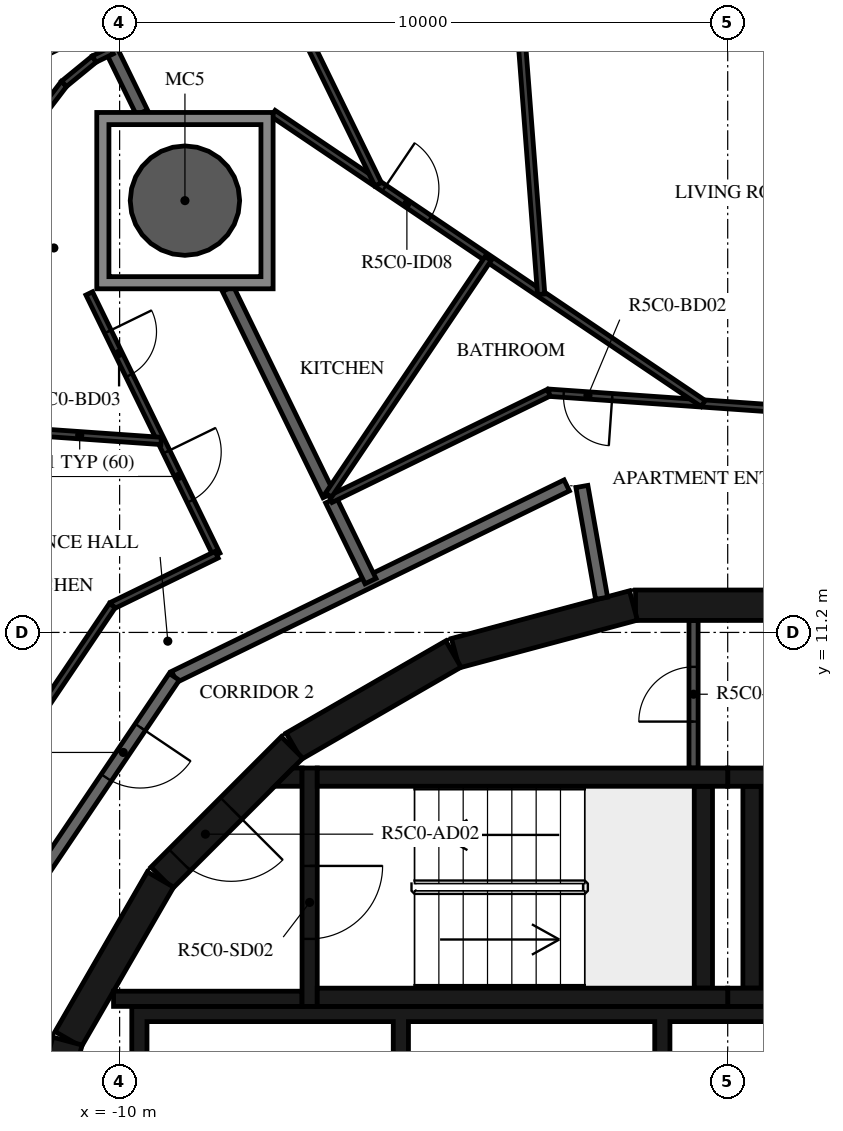
"""IFC4 building model, lengths in metres.
Left out: names, types, materials, properties, quantities, classifications, styles, units other than length and angle.
Written with IfcOpenShell. Run it as: python <this file> out.ifc"""

import sys

from ifc_helpers import new_model, si_unit, direction, frame, frame_2d, origin, origin_2d, place, context, subcontext, project, spatial, polyline, rectangle, hollow_circle, outline, extrude, element, fill, save


model = new_model("IFC4")
c1 = context("Model", 3, precision=1e-05, world=origin(), true_north=direction((0.0, 1.0)))
c2 = subcontext(c1, "Body", "Model", "MODEL_VIEW")
j1 = project(units=[si_unit("LENGTHUNIT", "METRE"), si_unit("PLANEANGLEUNIT", "RADIAN")], contexts=[c1])
p1 = place(None, origin())
s1 = spatial("IfcSite", under=j1, at=p1, CompositionType="ELEMENT")
p2 = place(p1, origin())
s2 = spatial("IfcBuilding", under=s1, at=p2, CompositionType="ELEMENT")
p3 = place(p2, frame((0.0, 0.0, 209.4)))
s3 = spatial("IfcBuildingStorey", under=s2, at=p3, CompositionType="ELEMENT", Elevation=209.4)
p4 = place(p3, frame((-8.926, 18.301, -0.38), z_axis=(0.0, 0.0, 1.0), x_axis=(1.0, 0.0, 0.0)))
e1 = element("IfcColumn", 1, at=p4, inside=s3, PredefinedType="COLUMN", context=c2, shape_type="SweptSolid", body=[
    extrude(hollow_circle(Radius=0.9, WallThickness=0.04, at=origin_2d()), origin(), (0.0, 0.0, 1.0), 3.5),
])
for number, where, z_axis, x_axis in (
    (2, (1.516, 11.647, 0.0), (0.0, 0.0, 1.0), (-1.0, 0.0, 0.0)),
    (3, (-1.55, 11.643, 0.0), (0.0, 0.0, 1.0), (-0.966, -0.259, 0.0)),
    (4, (-4.51, 10.845, 0.0), (0.0, 0.0, 1.0), (-0.866, -0.5, 0.0)),
):
    element("IfcWall", number, at=place(p3, frame(where, z_axis=z_axis, x_axis=x_axis)), inside=s3, PredefinedType="SHEAR", context=c2, shape_type="SweptSolid", body=[
        extrude(rectangle(XDim=3.033, YDim=0.5, at=frame_2d((1.516, 0.0))), origin(), (0.0, 0.0, 1.0), 3.12),
    ])
p5 = place(p3, frame((-7.164, 9.308, 0.0), z_axis=(0.0, 0.0, 1.0), x_axis=(-0.707106781187, -0.707106781187, 0.0)))
e5 = element("IfcWall", 5, at=p5, inside=s3, PredefinedType="SHEAR", context=c2, shape_type="SweptSolid", body=[
    extrude(rectangle(XDim=3.032, YDim=0.5, at=frame_2d((1.516, 0.0))), origin(), (0.0, 0.0, 1.0), 3.12),
])
p6 = place(p5, frame((1.416, 0.0, 0.0)))
e6 = element("IfcOpeningElement", 6, at=p6, cuts=e5, PredefinedType="OPENING", context=c2, shape_type="SweptSolid", body=[
    extrude(rectangle(XDim=1.2, YDim=2.1, at=frame_2d((0.6, 1.05))), frame((0.0, 0.26, 0.0), z_axis=(0.0, -1.0, 0.0), x_axis=(1.0, 0.0, 0.0)), (0.0, 0.0, 1.0), 0.52),
])
for number, where, z_axis, x_axis in (
    (7, (-9.329, 7.137, 0.0), (0.0, 0.0, 1.0), (-0.5, -0.866, 0.0)),
    (8, (-10.858, 4.479, 0.0), (0.0, 0.0, 1.0), (-0.259, -0.966, 0.0)),
):
    element("IfcWall", number, at=place(p3, frame(where, z_axis=z_axis, x_axis=x_axis)), inside=s3, PredefinedType="SHEAR", context=c2, shape_type="SweptSolid", body=[
        extrude(rectangle(XDim=3.033, YDim=0.5, at=frame_2d((1.516, 0.0))), origin(), (0.0, 0.0, 1.0), 3.12),
    ])
for number, where, z_axis, x_axis in (
    (9, (0.0, 5.2, 0.0), (0.0, 0.0, 1.0), (1.0, 0.0, 0.0)),
    (10, (0.0, 8.82, 0.0), (0.0, 0.0, 1.0), (1.0, 0.0, 0.0)),
):
    element("IfcWall", number, at=place(p3, frame(where, z_axis=z_axis, x_axis=x_axis)), inside=s3, PredefinedType="SHEAR", context=c2, shape_type="SweptSolid", body=[
        extrude(rectangle(XDim=6.75, YDim=0.3, at=frame_2d((3.375, 0.0))), origin(), (0.0, 0.0, 1.0), 3.12),
    ])
p7 = place(p3, frame((0.4, 5.35, 0.0), z_axis=(0.0, 0.0, 1.0), x_axis=(0.0, 1.0, 0.0)))
e11 = element("IfcWall", 11, at=p7, inside=s3, PredefinedType="SHEAR", context=c2, shape_type="SweptSolid", body=[
    extrude(rectangle(XDim=3.32, YDim=0.3, at=frame_2d((1.66, 0.0))), origin(), (0.0, 0.0, 1.0), 3.12),
])
for number, where, z_axis, x_axis in (
    (12, (-6.75, 5.2, 0.0), (0.0, 0.0, 1.0), (1.0, 0.0, 0.0)),
    (13, (-6.75, 8.82, 0.0), (0.0, 0.0, 1.0), (1.0, 0.0, 0.0)),
):
    element("IfcWall", number, at=place(p3, frame(where, z_axis=z_axis, x_axis=x_axis)), inside=s3, PredefinedType="SHEAR", context=c2, shape_type="SweptSolid", body=[
        extrude(rectangle(XDim=6.75, YDim=0.3, at=frame_2d((3.375, 0.0))), origin(), (0.0, 0.0, 1.0), 3.12),
    ])
p8 = place(p3, frame((-0.4, 5.35, 0.0), z_axis=(0.0, 0.0, 1.0), x_axis=(0.0, 1.0, 0.0)))
e14 = element("IfcWall", 14, at=p8, inside=s3, PredefinedType="SHEAR", context=c2, shape_type="SweptSolid", body=[
    extrude(rectangle(XDim=3.32, YDim=0.3, at=frame_2d((1.66, 0.0))), origin(), (0.0, 0.0, 1.0), 3.12),
])
p9 = place(p3, frame((-6.875, 8.97, 0.0), z_axis=(0.0, 0.0, 1.0), x_axis=(0.0, -1.0, 0.0)))
e15 = element("IfcWall", 15, at=p9, inside=s3, PredefinedType="SHEAR", context=c2, shape_type="SweptSolid", body=[
    extrude(rectangle(XDim=3.92, YDim=0.25, at=frame_2d((1.96, 0.0))), origin(), (0.0, 0.0, 1.0), 3.12),
])
p10 = place(p9, frame((1.61, 0.0, 0.0)))
e16 = element("IfcOpeningElement", 16, at=p10, cuts=e15, PredefinedType="OPENING", context=c2, shape_type="SweptSolid", body=[
    extrude(rectangle(XDim=1.2, YDim=2.1, at=frame_2d((0.6, 1.05))), frame((0.0, 0.135, 0.0), z_axis=(0.0, -1.0, 0.0), x_axis=(1.0, 0.0, 0.0)), (0.0, 0.0, 1.0), 0.27),
])
p11 = place(p3, frame((-7.0, 5.175, 0.0), z_axis=(0.0, 0.0, 1.0), x_axis=(-1.0, 0.0, 0.0)))
e17 = element("IfcWall", 17, at=p11, inside=s3, PredefinedType="SHEAR", context=c2, shape_type="SweptSolid", body=[
    extrude(rectangle(XDim=3.1, YDim=0.25, at=frame_2d((1.55, 0.0))), origin(), (0.0, 0.0, 1.0), 3.12),
])
p12 = place(p3, origin())
e18 = element("IfcWall", 18, at=p12, inside=s3, PredefinedType="SHEAR", context=c2, shape_type="SweptSolid", body=[
    extrude(outline(polyline([(-7.148, 8.97), (-7.0, 8.97), (-7.0, 8.67), (-7.448, 8.67), (-7.148, 8.97)])), origin(), (0.0, 0.0, 1.0), 3.12),
])
p13 = place(p3, origin())
e19 = element("IfcWall", 19, at=p13, inside=s3, PredefinedType="SHEAR", context=c2, shape_type="SweptSolid", body=[
    extrude(outline(polyline([(-9.55, 4.8), (-5.5, 4.8), (-5.5, 1.9), (-5.25, 1.9), (-5.25, 4.8), (-1.2, 4.8), (-1.2, 1.9), (-0.95, 1.9), (-0.95, 4.8), (0.95, 4.8), (0.95, 1.9), (1.2, 1.9), (1.2, 4.8), (3.1, 4.8), (3.1, 1.9), (3.35, 1.9), (3.35, 4.8), (5.25, 4.8), (5.25, 1.9), (5.5, 1.9), (5.5, 4.8), (7.4, 4.8), (7.4, 1.9), (7.65, 1.9), (7.65, 4.8), (9.55, 4.8), (9.55, 1.9), (9.8, 1.9), (9.8, 4.8), (9.8, 5.05), (-9.8, 5.05), (-9.8, 4.8), (-9.8, 1.9), (-9.55, 1.9), (-9.55, 4.8)])), origin(), (0.0, 0.0, 1.0), 3.12),
])
p14 = place(p3, frame((-0.562, 8.97, 0.0), z_axis=(0.0, 0.0, 1.0), x_axis=(0.0, 1.0, 0.0)))
e20 = element("IfcWall", 20, at=p14, inside=s3, PredefinedType="PARTITIONING", context=c2, shape_type="SweptSolid", body=[
    extrude(rectangle(XDim=2.427, YDim=0.15, at=frame_2d((1.214, 0.0))), origin(), (0.0, 0.0, 1.0), 3.12),
])
p15 = place(p14, frame((0.764, 0.0, 0.0)))
e21 = element("IfcOpeningElement", 21, at=p15, cuts=e20, PredefinedType="OPENING", context=c2, shape_type="SweptSolid", body=[
    extrude(rectangle(XDim=0.9, YDim=2.1, at=frame_2d((0.45, 1.05))), frame((0.0, 0.085, 0.0), z_axis=(0.0, -1.0, 0.0), x_axis=(1.0, 0.0, 0.0)), (0.0, 0.0, 1.0), 0.17),
])
p16 = place(p3, frame((-2.074, 11.761, 0.0), z_axis=(0.0, 0.0, 1.0), x_axis=(-0.173740587112, 0.984791454263, 0.0)))
e22 = element("IfcWall", 22, at=p16, inside=s3, PredefinedType="STANDARD", context=c2, shape_type="SweptSolid", body=[
    extrude(rectangle(XDim=1.867, YDim=0.2, at=frame_2d((0.934, 0.0))), origin(), (0.0, 0.0, 1.0), 3.12),
])
p17 = place(p3, frame((-2.647, 13.618, 0.0), z_axis=(0.0, 0.0, 1.0), x_axis=(-0.898796543751, -0.438366026218, 0.0)))
e23 = element("IfcWall", 23, at=p17, inside=s3, PredefinedType="STANDARD", context=c2, shape_type="SweptSolid", body=[
    extrude(rectangle(XDim=7.181, YDim=0.2, at=frame_2d((3.591, 0.0))), origin(), (0.0, 0.0, 1.0), 3.12),
])
p18 = place(p3, frame((-9.101, 10.47, 0.0), z_axis=(0.0, 0.0, 1.0), x_axis=(-0.559195469534, -0.829035841718, 0.0)))
e24 = element("IfcWall", 24, at=p18, inside=s3, PredefinedType="STANDARD", context=c2, shape_type="SweptSolid", body=[
    extrude(rectangle(XDim=7.181, YDim=0.2, at=frame_2d((3.591, 0.0))), origin(), (0.0, 0.0, 1.0), 3.12),
])
p19 = place(p18, frame((1.0, 0.0, 0.0)))
e25 = element("IfcOpeningElement", 25, at=p19, cuts=e24, PredefinedType="OPENING", context=c2, shape_type="SweptSolid", body=[
    extrude(rectangle(XDim=1.0, YDim=2.1, at=frame_2d((0.5, 1.05))), frame((0.0, 0.11, 0.0), z_axis=(0.0, -1.0, 0.0), x_axis=(1.0, 0.0, 0.0)), (0.0, 0.0, 1.0), 0.22),
])
p20 = place(p3, frame((-6.522, 13.373, 0.0), z_axis=(0.0, 0.0, 1.0), x_axis=(0.438277270821, -0.8988398266, 0.0)))
e26 = element("IfcWall", 26, at=p20, inside=s3, PredefinedType="STANDARD", context=c2, shape_type="SweptSolid", body=[
    extrude(rectangle(XDim=1.479, YDim=0.2, at=frame_2d((0.74, 0.0))), origin(), (0.0, 0.0, 1.0), 3.12),
])
p21 = place(p3, frame((-8.219, 16.851, 0.0), z_axis=(0.0, 0.0, 1.0), x_axis=(0.438291091101, -0.898833087654, 0.0)))
e27 = element("IfcWall", 27, at=p21, inside=s3, PredefinedType="STANDARD", context=c2, shape_type="SweptSolid", body=[
    extrude(rectangle(XDim=3.774, YDim=0.2, at=frame_2d((1.887, 0.0))), origin(), (0.0, 0.0, 1.0), 3.12),
])
p22 = place(p3, frame((-12.409, 25.442, 0.0), z_axis=(0.0, 0.0, 1.0), x_axis=(0.43838641251, -0.898786600549, 0.0)))
e28 = element("IfcWall", 28, at=p22, inside=s3, PredefinedType="STANDARD", context=c2, shape_type="SweptSolid", body=[
    extrude(rectangle(XDim=6.333, YDim=0.2, at=frame_2d((3.166, 0.0))), origin(), (0.0, 0.0, 1.0), 3.12),
])
p23 = place(p3, frame((4.477, 14.623, 0.0), z_axis=(0.0, 0.0, 1.0), x_axis=(-0.997564862172, 0.069744861884, 0.0)))
e29 = element("IfcWall", 29, at=p23, inside=s3, PredefinedType="PARTITIONING", context=c2, shape_type="SweptSolid", body=[
    extrude(rectangle(XDim=7.438, YDim=0.12, at=frame_2d((3.719, 0.0))), origin(), (0.0, 0.0, 1.0), 3.12),
])
p24 = place(p23, frame((0.2, 0.0, 0.0)))
e30 = element("IfcOpeningElement", 30, at=p24, cuts=e29, PredefinedType="OPENING", context=c2, shape_type="SweptSolid", body=[
    extrude(rectangle(XDim=0.9, YDim=2.1, at=frame_2d((0.45, 1.05))), frame((0.0, 0.07, 0.0), z_axis=(0.0, -1.0, 0.0), x_axis=(1.0, 0.0, 0.0)), (0.0, 0.0, 1.0), 0.14),
])
p25 = place(p23, frame((6.392, 0.0, 0.0)))
e31 = element("IfcOpeningElement", 31, at=p25, cuts=e29, PredefinedType="OPENING", context=c2, shape_type="SweptSolid", body=[
    extrude(rectangle(XDim=0.8, YDim=2.1, at=frame_2d((0.4, 1.05))), frame((0.0, 0.07, 0.0), z_axis=(0.0, -1.0, 0.0), x_axis=(1.0, 0.0, 0.0)), (0.0, 0.0, 1.0), 0.14),
])
p26 = place(p3, frame((-2.943, 15.142, 0.0), z_axis=(0.0, 0.0, 1.0), x_axis=(-0.89881075705, -0.438336883014, 0.0)))
e32 = element("IfcWall", 32, at=p26, inside=s3, PredefinedType="PARTITIONING", context=c2, shape_type="SweptSolid", body=[
    extrude(rectangle(XDim=3.992, YDim=0.12, at=frame_2d((1.996, 0.0))), origin(), (0.0, 0.0, 1.0), 3.12),
])
p27 = place(p3, frame((-7.476, 19.735, 0.0), z_axis=(0.0, 0.0, 1.0), x_axis=(0.829035412992, -0.559196105142, 0.0)))
e33 = element("IfcWall", 33, at=p27, inside=s3, PredefinedType="PARTITIONING", context=c2, shape_type="SweptSolid", body=[
    extrude(rectangle(XDim=8.531, YDim=0.12, at=frame_2d((4.266, 0.0))), origin(), (0.0, 0.0, 1.0), 3.12),
])
p28 = place(p27, frame((2.204, 0.0, 0.0)))
e34 = element("IfcOpeningElement", 34, at=p28, cuts=e33, PredefinedType="OPENING", context=c2, shape_type="SweptSolid", body=[
    extrude(rectangle(XDim=0.9, YDim=2.1, at=frame_2d((0.45, 1.05))), frame((0.0, 0.07, 0.0), z_axis=(0.0, -1.0, 0.0), x_axis=(1.0, 0.0, 0.0)), (0.0, 0.0, 1.0), 0.14),
])
p29 = place(p3, frame((-3.653, 24.394, 0.0), z_axis=(0.0, 0.0, 1.0), x_axis=(0.076513576433, -0.997068539581, 0.0)))
e35 = element("IfcWall", 35, at=p29, inside=s3, PredefinedType="PARTITIONING", context=c2, shape_type="SweptSolid", body=[
    extrude(rectangle(XDim=7.655, YDim=0.12, at=frame_2d((3.827, 0.0))), origin(), (0.0, 0.0, 1.0), 3.12),
])
p30 = place(p29, frame((0.6, 0.0, 0.0)))
e36 = element("IfcOpeningElement", 36, at=p30, cuts=e35, PredefinedType="OPENING", context=c2, shape_type="SweptSolid", body=[
    extrude(rectangle(XDim=0.9, YDim=2.1, at=frame_2d((0.45, 1.05))), frame((0.0, 0.07, 0.0), z_axis=(0.0, -1.0, 0.0), x_axis=(1.0, 0.0, 0.0)), (0.0, 0.0, 1.0), 0.14),
])
p31 = place(p3, frame((-3.939, 17.35, 0.0), z_axis=(0.0, 0.0, 1.0), x_axis=(-0.559193216274, -0.829037361566, 0.0)))
e37 = element("IfcWall", 37, at=p31, inside=s3, PredefinedType="PARTITIONING", context=c2, shape_type="SweptSolid", body=[
    extrude(rectangle(XDim=4.694, YDim=0.12, at=frame_2d((2.347, 0.0))), origin(), (0.0, 0.0, 1.0), 3.12),
])
p32 = place(p3, frame((-9.496, 26.254, 0.0), z_axis=(0.0, 0.0, 1.0), x_axis=(0.438361739807, -0.89879863433, 0.0)))
e38 = element("IfcWall", 38, at=p32, inside=s3, PredefinedType="PARTITIONING", context=c2, shape_type="SweptSolid", body=[
    extrude(rectangle(XDim=8.549, YDim=0.12, at=frame_2d((4.274, 0.0))), origin(), (0.0, 0.0, 1.0), 3.12),
])
p33 = place(p32, frame((0.4, 0.0, 0.0)))
e39 = element("IfcOpeningElement", 39, at=p33, cuts=e38, PredefinedType="OPENING", context=c2, shape_type="SweptSolid", body=[
    extrude(rectangle(XDim=0.9, YDim=2.1, at=frame_2d((0.45, 1.05))), frame((0.0, 0.07, 0.0), z_axis=(0.0, -1.0, 0.0), x_axis=(1.0, 0.0, 0.0)), (0.0, 0.0, 1.0), 0.14),
])
p34 = place(p3, frame((-10.5, 16.775, 0.0), z_axis=(0.0, 0.0, 1.0), x_axis=(0.438345136783, -0.898806731761, 0.0)))
e40 = element("IfcWall", 40, at=p34, inside=s3, PredefinedType="PARTITIONING", context=c2, shape_type="SweptSolid", body=[
    extrude(rectangle(XDim=4.78, YDim=0.12, at=frame_2d((2.39, 0.0))), origin(), (0.0, 0.0, 1.0), 3.12),
])
p35 = place(p34, frame((0.7, 0.0, 0.0)))
e41 = element("IfcOpeningElement", 41, at=p35, cuts=e40, PredefinedType="OPENING", context=c2, shape_type="SweptSolid", body=[
    extrude(rectangle(XDim=0.8, YDim=2.1, at=frame_2d((0.4, 1.05))), frame((0.0, 0.07, 0.0), z_axis=(0.0, -1.0, 0.0), x_axis=(1.0, 0.0, 0.0)), (0.0, 0.0, 1.0), 0.14),
])
p36 = place(p34, frame((2.899, 0.0, 0.0)))
e42 = element("IfcOpeningElement", 42, at=p36, cuts=e40, PredefinedType="OPENING", context=c2, shape_type="SweptSolid", body=[
    extrude(rectangle(XDim=0.9, YDim=2.1, at=frame_2d((0.45, 1.05))), frame((0.0, 0.07, 0.0), z_axis=(0.0, -1.0, 0.0), x_axis=(1.0, 0.0, 0.0)), (0.0, 0.0, 1.0), 0.14),
])
p37 = place(p3, frame((-8.405, 12.479, 0.0), z_axis=(0.0, 0.0, 1.0), x_axis=(-0.898784427692, -0.438390867307, 0.0)))
e43 = element("IfcWall", 43, at=p37, inside=s3, PredefinedType="PARTITIONING", context=c2, shape_type="SweptSolid", body=[
    extrude(rectangle(XDim=1.908, YDim=0.12, at=frame_2d((0.954, 0.0))), origin(), (0.0, 0.0, 1.0), 3.12),
])
p38 = place(p3, frame((-10.12, 11.642, 0.0), z_axis=(0.0, 0.0, 1.0), x_axis=(-0.55920080659, -0.829032241779, 0.0)))
e44 = element("IfcWall", 44, at=p38, inside=s3, PredefinedType="PARTITIONING", context=c2, shape_type="SweptSolid", body=[
    extrude(rectangle(XDim=7.985, YDim=0.12, at=frame_2d((3.992, 0.0))), origin(), (0.0, 0.0, 1.0), 3.12),
])
p39 = place(p38, frame((4.346, 0.0, 0.0)))
e45 = element("IfcOpeningElement", 45, at=p39, cuts=e44, PredefinedType="OPENING", context=c2, shape_type="SweptSolid", body=[
    extrude(rectangle(XDim=0.9, YDim=2.1, at=frame_2d((0.45, 1.05))), frame((0.0, 0.07, 0.0), z_axis=(0.0, -1.0, 0.0), x_axis=(1.0, 0.0, 0.0)), (0.0, 0.0, 1.0), 0.14),
])
for number, where, z_axis, x_axis in (
    (46, (-11.304, 19.711, 0.0), (0.0, 0.0, 1.0), (0.607, 0.795, 0.0)),
    (47, (-10.915, 20.221, 0.0), (0.0, 0.0, 1.0), (0.773, 0.634, 0.0)),
):
    element("IfcWall", number, at=place(p3, frame(where, z_axis=z_axis, x_axis=x_axis)), inside=s3, PredefinedType="PARTITIONING", context=c2, shape_type="SweptSolid", body=[
        extrude(rectangle(XDim=0.642, YDim=0.12, at=frame_2d((0.321, 0.0))), origin(), (0.0, 0.0, 1.0), 3.12),
    ])
p40 = place(p3, frame((-10.418, 20.628, 0.0), z_axis=(0.0, 0.0, 1.0), x_axis=(0.898943795765, 0.438063981692, 0.0)))
e48 = element("IfcWall", 48, at=p40, inside=s3, PredefinedType="PARTITIONING", context=c2, shape_type="SweptSolid", body=[
    extrude(rectangle(XDim=0.321, YDim=0.12, at=frame_2d((0.161, 0.0))), origin(), (0.0, 0.0, 1.0), 3.12),
])
p41 = place(p3, frame((-11.996, 14.536, 0.0), z_axis=(0.0, 0.0, 1.0), x_axis=(0.997565991425, -0.069728708231, 0.0)))
e49 = element("IfcWall", 49, at=p41, inside=s3, PredefinedType="PARTITIONING", context=c2, shape_type="SweptSolid", body=[
    extrude(rectangle(XDim=2.686, YDim=0.12, at=frame_2d((1.343, 0.0))), origin(), (0.0, 0.0, 1.0), 3.12),
])
p42 = place(p3, origin())
e50 = element("IfcWall", 50, at=p42, inside=s3, PredefinedType="STANDARD", context=c2, shape_type="SweptSolid", body=[
    extrude(outline(polyline([(-7.476, 19.751), (-7.476, 16.851), (-10.376, 16.851), (-10.376, 19.751), (-7.476, 19.751)]), holes=[polyline([(-10.176, 17.051), (-7.676, 17.051), (-7.676, 19.551), (-10.176, 19.551), (-10.176, 17.051)])]), origin(), (0.0, 0.0, 1.0), 3.12),
])
p43 = place(p10, origin())
e51 = element("IfcDoor", 51, at=p43, inside=s3, OperationType="SINGLE_SWING_LEFT", PredefinedType="DOOR", context=c2, shape_type="SweptSolid", body=[
    extrude(rectangle(XDim=1.2, YDim=2.1, at=frame_2d((0.6, 1.05))), frame((0.0, 0.025, 0.0), z_axis=(0.0, -1.0, 0.0), x_axis=(1.0, 0.0, 0.0)), (0.0, 0.0, 1.0), 0.05),
])
fill(e16, e51)
p44 = place(p6, origin())
e52 = element("IfcDoor", 52, at=p44, inside=s3, OperationType="SINGLE_SWING_RIGHT", PredefinedType="DOOR", context=c2, shape_type="SweptSolid", body=[
    extrude(rectangle(XDim=1.2, YDim=2.1, at=frame_2d((0.6, 1.05))), frame((0.0, 0.025, 0.0), z_axis=(0.0, -1.0, 0.0), x_axis=(1.0, 0.0, 0.0)), (0.0, 0.0, 1.0), 0.05),
])
fill(e6, e52)
p45 = place(p15, origin())
e53 = element("IfcDoor", 53, at=p45, inside=s3, OperationType="SINGLE_SWING_LEFT", PredefinedType="DOOR", context=c2, shape_type="SweptSolid", body=[
    extrude(rectangle(XDim=0.9, YDim=2.1, at=frame_2d((0.45, 1.05))), frame((0.0, 0.025, 0.0), z_axis=(0.0, -1.0, 0.0), x_axis=(1.0, 0.0, 0.0)), (0.0, 0.0, 1.0), 0.05),
])
fill(e21, e53)
p46 = place(p25, origin())
e54 = element("IfcDoor", 54, at=p46, inside=s3, OperationType="SINGLE_SWING_RIGHT", PredefinedType="DOOR", context=c2, shape_type="SweptSolid", body=[
    extrude(rectangle(XDim=0.8, YDim=2.1, at=frame_2d((0.4, 1.05))), frame((0.0, 0.025, 0.0), z_axis=(0.0, -1.0, 0.0), x_axis=(1.0, 0.0, 0.0)), (0.0, 0.0, 1.0), 0.05),
])
fill(e31, e54)
p47 = place(p28, origin())
e55 = element("IfcDoor", 55, at=p47, inside=s3, OperationType="SINGLE_SWING_LEFT", PredefinedType="DOOR", context=c2, shape_type="SweptSolid", body=[
    extrude(rectangle(XDim=0.9, YDim=2.1, at=frame_2d((0.45, 1.05))), frame((0.0, 0.025, 0.0), z_axis=(0.0, -1.0, 0.0), x_axis=(1.0, 0.0, 0.0)), (0.0, 0.0, 1.0), 0.05),
])
fill(e34, e55)
p48 = place(p19, origin())
e56 = element("IfcDoor", 56, at=p48, inside=s3, OperationType="SINGLE_SWING_LEFT", PredefinedType="DOOR", context=c2, shape_type="SweptSolid", body=[
    extrude(rectangle(XDim=1.0, YDim=2.1, at=frame_2d((0.5, 1.05))), frame((0.0, 0.025, 0.0), z_axis=(0.0, -1.0, 0.0), x_axis=(1.0, 0.0, 0.0)), (0.0, 0.0, 1.0), 0.05),
])
fill(e25, e56)
p49 = place(p35, origin())
e57 = element("IfcDoor", 57, at=p49, inside=s3, OperationType="SINGLE_SWING_LEFT", PredefinedType="DOOR", context=c2, shape_type="SweptSolid", body=[
    extrude(rectangle(XDim=0.8, YDim=2.1, at=frame_2d((0.4, 1.05))), frame((0.0, 0.025, 0.0), z_axis=(0.0, -1.0, 0.0), x_axis=(1.0, 0.0, 0.0)), (0.0, 0.0, 1.0), 0.05),
])
fill(e41, e57)
p50 = place(p36, origin())
e58 = element("IfcDoor", 58, at=p50, inside=s3, OperationType="SINGLE_SWING_LEFT", PredefinedType="DOOR", context=c2, shape_type="SweptSolid", body=[
    extrude(rectangle(XDim=0.9, YDim=2.1, at=frame_2d((0.45, 1.05))), frame((0.0, 0.025, 0.0), z_axis=(0.0, -1.0, 0.0), x_axis=(1.0, 0.0, 0.0)), (0.0, 0.0, 1.0), 0.05),
])
fill(e42, e58)
save(model, sys.argv[1])
